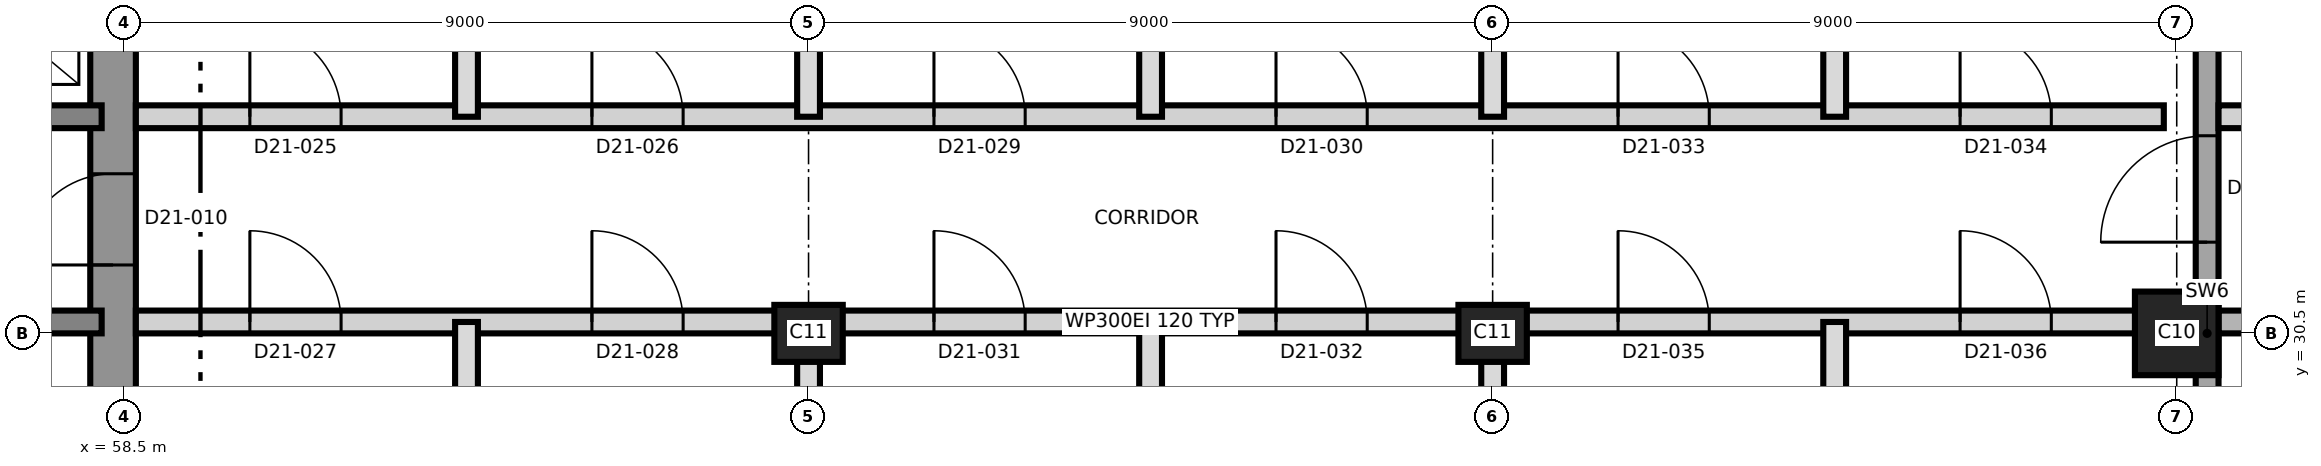
"""IFC4 building model, lengths in metres.
Left out: names, types, materials, properties, quantities, classifications, styles, units other than length and angle.
Written with IfcOpenShell. Run it as: python <this file> out.ifc"""

import sys

from ifc_helpers import new_model, si_unit, direction, frame, frame_2d, origin, origin_2d, place, context, subcontext, project, spatial, rectangle, extrude, element, fill, save


model = new_model("IFC4")
c1 = context("Model", 3, precision=1e-05, world=origin(), true_north=direction((0.0, 1.0)))
c2 = subcontext(c1, "Body", "Model", "MODEL_VIEW")
j1 = project(units=[si_unit("LENGTHUNIT", "METRE"), si_unit("PLANEANGLEUNIT", "RADIAN")], contexts=[c1])
p1 = place(None, origin())
s1 = spatial("IfcSite", under=j1, at=p1, CompositionType="ELEMENT")
p2 = place(p1, origin())
s2 = spatial("IfcBuilding", under=s1, at=p2, CompositionType="ELEMENT")
p3 = place(p2, frame((0.0, 0.0, 190.3)))
s3 = spatial("IfcBuildingStorey", under=s2, at=p3, CompositionType="ELEMENT", Elevation=190.3)
p4 = place(p3, frame((58.35, 21.2, 0.0), z_axis=(0.0, 0.0, 1.0), x_axis=(0.0, 1.0, 0.0)))
e1 = element("IfcWall", 1, at=p4, inside=s3, PredefinedType="SHEAR", context=c2, shape_type="SweptSolid", body=[
    extrude(rectangle(XDim=18.6, YDim=0.6, at=frame_2d((9.3, 0.0))), origin(), (0.0, 0.0, 1.0), 5.5),
])
p5 = place(p4, frame((10.2, 0.0, 0.0)))
e2 = element("IfcOpeningElement", 2, at=p5, cuts=e1, PredefinedType="OPENING", context=c2, shape_type="SweptSolid", body=[
    extrude(rectangle(XDim=1.2, YDim=2.1, at=frame_2d((0.6, 1.05))), frame((0.0, 0.31, 0.0), z_axis=(0.0, -1.0, 0.0), x_axis=(1.0, 0.0, 0.0)), (0.0, 0.0, 1.0), 0.62),
])
p6 = place(p3, frame((31.8, 30.65, 0.0), z_axis=(0.0, 0.0, 1.0), x_axis=(1.0, 0.0, 0.0)))
e3 = element("IfcWall", 3, at=p6, inside=s3, PredefinedType="SHEAR", context=c2, shape_type="SweptSolid", body=[
    extrude(rectangle(XDim=26.4, YDim=0.3, at=frame_2d((13.2, 0.0))), origin(), (0.0, 0.0, 1.0), 5.5),
])
p7 = place(p6, frame((24.7, 0.0, 0.0)))
e4 = element("IfcOpeningElement", 4, at=p7, cuts=e3, PredefinedType="OPENING", context=c2, shape_type="SweptSolid", body=[
    extrude(rectangle(XDim=1.0, YDim=2.1, at=frame_2d((0.5, 1.05))), frame((0.0, 0.16, 0.0), z_axis=(0.0, -1.0, 0.0), x_axis=(1.0, 0.0, 0.0)), (0.0, 0.0, 1.0), 0.32),
])
p8 = place(p3, frame((31.8, 33.35, 0.0), z_axis=(0.0, 0.0, 1.0), x_axis=(1.0, 0.0, 0.0)))
e5 = element("IfcWall", 5, at=p8, inside=s3, PredefinedType="SHEAR", context=c2, shape_type="SweptSolid", body=[
    extrude(rectangle(XDim=26.4, YDim=0.3, at=frame_2d((13.2, 0.0))), origin(), (0.0, 0.0, 1.0), 5.5),
])
p9 = place(p8, frame((13.85, 0.0, 0.0)))
e6 = element("IfcOpeningElement", 6, at=p9, cuts=e5, PredefinedType="OPENING", context=c2, shape_type="SweptSolid", body=[
    extrude(rectangle(XDim=1.4, YDim=2.1, at=frame_2d((0.7, 1.05))), frame((0.0, 0.16, 0.0), z_axis=(0.0, -1.0, 0.0), x_axis=(1.0, 0.0, 0.0)), (0.0, 0.0, 1.0), 0.32),
])
p10 = place(p8, frame((5.325, 0.0, 0.0)))
e7 = element("IfcOpeningElement", 7, at=p10, cuts=e5, PredefinedType="OPENING", context=c2, shape_type="SweptSolid", body=[
    extrude(rectangle(XDim=1.2, YDim=2.1, at=frame_2d((0.6, 1.05))), frame((0.0, 0.16, 0.0), z_axis=(0.0, -1.0, 0.0), x_axis=(1.0, 0.0, 0.0)), (0.0, 0.0, 1.0), 0.32),
])
p11 = place(p8, frame((19.875, 0.0, 0.0)))
e8 = element("IfcOpeningElement", 8, at=p11, cuts=e5, PredefinedType="OPENING", context=c2, shape_type="SweptSolid", body=[
    extrude(rectangle(XDim=1.2, YDim=2.1, at=frame_2d((0.6, 1.05))), frame((0.0, 0.16, 0.0), z_axis=(0.0, -1.0, 0.0), x_axis=(1.0, 0.0, 0.0)), (0.0, 0.0, 1.0), 0.32),
])
for number, where, z_axis, x_axis in (
    (9, (67.5, 30.5, 0.0), (0.0, 0.0, 1.0), (1.0, 0.0, 0.0)),
    (10, (76.5, 30.5, 0.0), (0.0, 0.0, 1.0), (1.0, 0.0, 0.0)),
):
    element("IfcColumn", number, at=place(p3, frame(where, z_axis=z_axis, x_axis=x_axis)), inside=s3, PredefinedType="COLUMN", context=c2, shape_type="SweptSolid", body=[
        extrude(rectangle(XDim=0.9, YDim=0.75, at=origin_2d()), origin(), (0.0, 0.0, 1.0), 5.5),
    ])
p12 = place(p3, frame((85.5, 30.5, 0.0), z_axis=(0.0, 0.0, 1.0), x_axis=(1.0, 0.0, 0.0)))
e11 = element("IfcColumn", 11, at=p12, inside=s3, PredefinedType="COLUMN", context=c2, shape_type="SweptSolid", body=[
    extrude(rectangle(XDim=1.1, YDim=1.1, at=origin_2d()), origin(), (0.0, 0.0, 1.0), 5.5),
])
p13 = place(p3, frame((85.9, 20.35, 0.0), z_axis=(0.0, 0.0, 1.0), x_axis=(0.0, 1.0, 0.0)))
e12 = element("IfcWall", 12, at=p13, inside=s3, PredefinedType="SHEAR", context=c2, shape_type="SweptSolid", body=[
    extrude(rectangle(XDim=20.3, YDim=0.3, at=frame_2d((10.15, 0.0))), origin(), (0.0, 0.0, 1.0), 5.5),
])
p14 = place(p13, frame((11.35, 0.0, 0.0)))
e13 = element("IfcOpeningElement", 13, at=p14, cuts=e12, PredefinedType="OPENING", context=c2, shape_type="SweptSolid", body=[
    extrude(rectangle(XDim=1.4, YDim=2.1, at=frame_2d((0.7, 1.05))), frame((0.0, 0.16, 0.0), z_axis=(0.0, -1.0, 0.0), x_axis=(1.0, 0.0, 0.0)), (0.0, 0.0, 1.0), 0.32),
])
p15 = place(p3, frame((58.65, 30.65, 0.0), z_axis=(0.0, 0.0, 1.0), x_axis=(1.0, 0.0, 0.0)))
e14 = element("IfcWall", 14, at=p15, inside=s3, PredefinedType="PARTITIONING", context=c2, shape_type="SweptSolid", body=[
    extrude(rectangle(XDim=26.68, YDim=0.3, at=frame_2d((13.34, 0.0))), origin(), (0.0, 0.0, 1.0), 5.2),
])
p16 = place(p15, frame((1.5, 0.0, 0.0)))
e15 = element("IfcOpeningElement", 15, at=p16, cuts=e14, PredefinedType="OPENING", context=c2, shape_type="SweptSolid", body=[
    extrude(rectangle(XDim=1.2, YDim=2.1, at=frame_2d((0.6, 1.05))), frame((0.0, 0.16, 0.0), z_axis=(0.0, -1.0, 0.0), x_axis=(1.0, 0.0, 0.0)), (0.0, 0.0, 1.0), 0.32),
])
p17 = place(p15, frame((6.0, 0.0, 0.0)))
e16 = element("IfcOpeningElement", 16, at=p17, cuts=e14, PredefinedType="OPENING", context=c2, shape_type="SweptSolid", body=[
    extrude(rectangle(XDim=1.2, YDim=2.1, at=frame_2d((0.6, 1.05))), frame((0.0, 0.16, 0.0), z_axis=(0.0, -1.0, 0.0), x_axis=(1.0, 0.0, 0.0)), (0.0, 0.0, 1.0), 0.32),
])
p18 = place(p15, frame((10.5, 0.0, 0.0)))
e17 = element("IfcOpeningElement", 17, at=p18, cuts=e14, PredefinedType="OPENING", context=c2, shape_type="SweptSolid", body=[
    extrude(rectangle(XDim=1.2, YDim=2.1, at=frame_2d((0.6, 1.05))), frame((0.0, 0.16, 0.0), z_axis=(0.0, -1.0, 0.0), x_axis=(1.0, 0.0, 0.0)), (0.0, 0.0, 1.0), 0.32),
])
p19 = place(p15, frame((15.0, 0.0, 0.0)))
e18 = element("IfcOpeningElement", 18, at=p19, cuts=e14, PredefinedType="OPENING", context=c2, shape_type="SweptSolid", body=[
    extrude(rectangle(XDim=1.2, YDim=2.1, at=frame_2d((0.6, 1.05))), frame((0.0, 0.16, 0.0), z_axis=(0.0, -1.0, 0.0), x_axis=(1.0, 0.0, 0.0)), (0.0, 0.0, 1.0), 0.32),
])
p20 = place(p15, frame((19.5, 0.0, 0.0)))
e19 = element("IfcOpeningElement", 19, at=p20, cuts=e14, PredefinedType="OPENING", context=c2, shape_type="SweptSolid", body=[
    extrude(rectangle(XDim=1.2, YDim=2.1, at=frame_2d((0.6, 1.05))), frame((0.0, 0.16, 0.0), z_axis=(0.0, -1.0, 0.0), x_axis=(1.0, 0.0, 0.0)), (0.0, 0.0, 1.0), 0.32),
])
p21 = place(p15, frame((24.0, 0.0, 0.0)))
e20 = element("IfcOpeningElement", 20, at=p21, cuts=e14, PredefinedType="OPENING", context=c2, shape_type="SweptSolid", body=[
    extrude(rectangle(XDim=1.2, YDim=2.1, at=frame_2d((0.6, 1.05))), frame((0.0, 0.16, 0.0), z_axis=(0.0, -1.0, 0.0), x_axis=(1.0, 0.0, 0.0)), (0.0, 0.0, 1.0), 0.32),
])
p22 = place(p3, frame((86.05, 30.65, 0.0), z_axis=(0.0, 0.0, 1.0), x_axis=(1.0, 0.0, 0.0)))
e21 = element("IfcWall", 21, at=p22, inside=s3, PredefinedType="SHEAR", context=c2, shape_type="SweptSolid", body=[
    extrude(rectangle(XDim=9.2, YDim=0.3, at=frame_2d((4.6, 0.0))), origin(), (0.0, 0.0, 1.0), 5.2),
])
p23 = place(p22, frame((1.7, 0.0, 0.0)))
e22 = element("IfcOpeningElement", 22, at=p23, cuts=e21, PredefinedType="OPENING", context=c2, shape_type="SweptSolid", body=[
    extrude(rectangle(XDim=1.2, YDim=2.1, at=frame_2d((0.6, 1.05))), frame((0.0, 0.16, 0.0), z_axis=(0.0, -1.0, 0.0), x_axis=(1.0, 0.0, 0.0)), (0.0, 0.0, 1.0), 0.32),
])
p24 = place(p22, frame((5.25, 0.0, 0.0)))
e23 = element("IfcOpeningElement", 23, at=p24, cuts=e21, PredefinedType="OPENING", context=c2, shape_type="SweptSolid", body=[
    extrude(rectangle(XDim=1.0, YDim=2.1, at=frame_2d((0.5, 1.05))), frame((0.0, 0.16, 0.0), z_axis=(0.0, -1.0, 0.0), x_axis=(1.0, 0.0, 0.0)), (0.0, 0.0, 1.0), 0.32),
])
p25 = place(p3, frame((58.65, 33.35, 0.0), z_axis=(0.0, 0.0, 1.0), x_axis=(1.0, 0.0, 0.0)))
e24 = element("IfcWall", 24, at=p25, inside=s3, PredefinedType="PARTITIONING", context=c2, shape_type="SweptSolid", body=[
    extrude(rectangle(XDim=26.68, YDim=0.3, at=frame_2d((13.34, 0.0))), origin(), (0.0, 0.0, 1.0), 5.2),
])
p26 = place(p25, frame((1.5, 0.0, 0.0)))
e25 = element("IfcOpeningElement", 25, at=p26, cuts=e24, PredefinedType="OPENING", context=c2, shape_type="SweptSolid", body=[
    extrude(rectangle(XDim=1.2, YDim=2.1, at=frame_2d((0.6, 1.05))), frame((0.0, 0.16, 0.0), z_axis=(0.0, -1.0, 0.0), x_axis=(1.0, 0.0, 0.0)), (0.0, 0.0, 1.0), 0.32),
])
p27 = place(p25, frame((6.0, 0.0, 0.0)))
e26 = element("IfcOpeningElement", 26, at=p27, cuts=e24, PredefinedType="OPENING", context=c2, shape_type="SweptSolid", body=[
    extrude(rectangle(XDim=1.2, YDim=2.1, at=frame_2d((0.6, 1.05))), frame((0.0, 0.16, 0.0), z_axis=(0.0, -1.0, 0.0), x_axis=(1.0, 0.0, 0.0)), (0.0, 0.0, 1.0), 0.32),
])
p28 = place(p25, frame((10.5, 0.0, 0.0)))
e27 = element("IfcOpeningElement", 27, at=p28, cuts=e24, PredefinedType="OPENING", context=c2, shape_type="SweptSolid", body=[
    extrude(rectangle(XDim=1.2, YDim=2.1, at=frame_2d((0.6, 1.05))), frame((0.0, 0.16, 0.0), z_axis=(0.0, -1.0, 0.0), x_axis=(1.0, 0.0, 0.0)), (0.0, 0.0, 1.0), 0.32),
])
p29 = place(p25, frame((15.0, 0.0, 0.0)))
e28 = element("IfcOpeningElement", 28, at=p29, cuts=e24, PredefinedType="OPENING", context=c2, shape_type="SweptSolid", body=[
    extrude(rectangle(XDim=1.2, YDim=2.1, at=frame_2d((0.6, 1.05))), frame((0.0, 0.16, 0.0), z_axis=(0.0, -1.0, 0.0), x_axis=(1.0, 0.0, 0.0)), (0.0, 0.0, 1.0), 0.32),
])
p30 = place(p25, frame((19.5, 0.0, 0.0)))
e29 = element("IfcOpeningElement", 29, at=p30, cuts=e24, PredefinedType="OPENING", context=c2, shape_type="SweptSolid", body=[
    extrude(rectangle(XDim=1.2, YDim=2.1, at=frame_2d((0.6, 1.05))), frame((0.0, 0.16, 0.0), z_axis=(0.0, -1.0, 0.0), x_axis=(1.0, 0.0, 0.0)), (0.0, 0.0, 1.0), 0.32),
])
p31 = place(p25, frame((24.0, 0.0, 0.0)))
e30 = element("IfcOpeningElement", 30, at=p31, cuts=e24, PredefinedType="OPENING", context=c2, shape_type="SweptSolid", body=[
    extrude(rectangle(XDim=1.2, YDim=2.1, at=frame_2d((0.6, 1.05))), frame((0.0, 0.16, 0.0), z_axis=(0.0, -1.0, 0.0), x_axis=(1.0, 0.0, 0.0)), (0.0, 0.0, 1.0), 0.32),
])
p32 = place(p3, frame((86.05, 33.35, 0.0), z_axis=(0.0, 0.0, 1.0), x_axis=(1.0, 0.0, 0.0)))
e31 = element("IfcWall", 31, at=p32, inside=s3, PredefinedType="PARTITIONING", context=c2, shape_type="SweptSolid", body=[
    extrude(rectangle(XDim=9.325, YDim=0.3, at=frame_2d((4.663, 0.0))), origin(), (0.0, 0.0, 1.0), 5.2),
])
p33 = place(p32, frame((2.35, 0.0, 0.0)))
e32 = element("IfcOpeningElement", 32, at=p33, cuts=e31, PredefinedType="OPENING", context=c2, shape_type="SweptSolid", body=[
    extrude(rectangle(XDim=1.2, YDim=2.1, at=frame_2d((0.6, 1.05))), frame((0.0, 0.16, 0.0), z_axis=(0.0, -1.0, 0.0), x_axis=(1.0, 0.0, 0.0)), (0.0, 0.0, 1.0), 0.32),
])
p34 = place(p3, frame((63.0, 21.9, 0.0), z_axis=(0.0, 0.0, 1.0), x_axis=(0.0, 1.0, 0.0)))
e33 = element("IfcWall", 33, at=p34, inside=s3, PredefinedType="PARTITIONING", context=c2, shape_type="SweptSolid", body=[
    extrude(rectangle(XDim=8.75, YDim=0.3, at=frame_2d((4.375, 0.0))), origin(), (0.0, 0.0, 1.0), 5.2),
])
p35 = place(p3, frame((63.0, 33.35, 0.0), z_axis=(0.0, 0.0, 1.0), x_axis=(0.0, 1.0, 0.0)))
e34 = element("IfcWall", 34, at=p35, inside=s3, PredefinedType="PARTITIONING", context=c2, shape_type="SweptSolid", body=[
    extrude(rectangle(XDim=5.75, YDim=0.3, at=frame_2d((2.875, 0.0))), origin(), (0.0, 0.0, 1.0), 5.2),
])
p36 = place(p3, frame((67.5, 21.9, 0.0), z_axis=(0.0, 0.0, 1.0), x_axis=(0.0, 1.0, 0.0)))
e35 = element("IfcWall", 35, at=p36, inside=s3, PredefinedType="PARTITIONING", context=c2, shape_type="SweptSolid", body=[
    extrude(rectangle(XDim=8.75, YDim=0.3, at=frame_2d((4.375, 0.0))), origin(), (0.0, 0.0, 1.0), 5.2),
])
p37 = place(p3, frame((67.5, 33.35, 0.0), z_axis=(0.0, 0.0, 1.0), x_axis=(0.0, 1.0, 0.0)))
e36 = element("IfcWall", 36, at=p37, inside=s3, PredefinedType="PARTITIONING", context=c2, shape_type="SweptSolid", body=[
    extrude(rectangle(XDim=5.75, YDim=0.3, at=frame_2d((2.875, 0.0))), origin(), (0.0, 0.0, 1.0), 5.2),
])
p38 = place(p3, frame((72.0, 21.9, 0.0), z_axis=(0.0, 0.0, 1.0), x_axis=(0.0, 1.0, 0.0)))
e37 = element("IfcWall", 37, at=p38, inside=s3, PredefinedType="PARTITIONING", context=c2, shape_type="SweptSolid", body=[
    extrude(rectangle(XDim=8.75, YDim=0.3, at=frame_2d((4.375, 0.0))), origin(), (0.0, 0.0, 1.0), 5.2),
])
p39 = place(p3, frame((72.0, 33.35, 0.0), z_axis=(0.0, 0.0, 1.0), x_axis=(0.0, 1.0, 0.0)))
e38 = element("IfcWall", 38, at=p39, inside=s3, PredefinedType="PARTITIONING", context=c2, shape_type="SweptSolid", body=[
    extrude(rectangle(XDim=5.75, YDim=0.3, at=frame_2d((2.875, 0.0))), origin(), (0.0, 0.0, 1.0), 5.2),
])
p40 = place(p3, frame((76.5, 21.9, 0.0), z_axis=(0.0, 0.0, 1.0), x_axis=(0.0, 1.0, 0.0)))
e39 = element("IfcWall", 39, at=p40, inside=s3, PredefinedType="PARTITIONING", context=c2, shape_type="SweptSolid", body=[
    extrude(rectangle(XDim=8.75, YDim=0.3, at=frame_2d((4.375, 0.0))), origin(), (0.0, 0.0, 1.0), 5.2),
])
p41 = place(p3, frame((76.5, 33.35, 0.0), z_axis=(0.0, 0.0, 1.0), x_axis=(0.0, 1.0, 0.0)))
e40 = element("IfcWall", 40, at=p41, inside=s3, PredefinedType="PARTITIONING", context=c2, shape_type="SweptSolid", body=[
    extrude(rectangle(XDim=5.75, YDim=0.3, at=frame_2d((2.875, 0.0))), origin(), (0.0, 0.0, 1.0), 5.2),
])
p42 = place(p3, frame((81.0, 21.9, 0.0), z_axis=(0.0, 0.0, 1.0), x_axis=(0.0, 1.0, 0.0)))
e41 = element("IfcWall", 41, at=p42, inside=s3, PredefinedType="PARTITIONING", context=c2, shape_type="SweptSolid", body=[
    extrude(rectangle(XDim=8.75, YDim=0.3, at=frame_2d((4.375, 0.0))), origin(), (0.0, 0.0, 1.0), 5.2),
])
p43 = place(p3, frame((81.0, 33.35, 0.0), z_axis=(0.0, 0.0, 1.0), x_axis=(0.0, 1.0, 0.0)))
e42 = element("IfcWall", 42, at=p43, inside=s3, PredefinedType="PARTITIONING", context=c2, shape_type="SweptSolid", body=[
    extrude(rectangle(XDim=5.75, YDim=0.3, at=frame_2d((2.875, 0.0))), origin(), (0.0, 0.0, 1.0), 5.2),
])
p44 = place(p5, origin())
e43 = element("IfcDoor", 43, at=p44, inside=s3, OperationType="SINGLE_SWING_LEFT", PredefinedType="DOOR", context=c2, shape_type="SweptSolid", body=[
    extrude(rectangle(XDim=1.2, YDim=2.1, at=frame_2d((0.6, 1.05))), frame((0.0, 0.025, 0.0), z_axis=(0.0, -1.0, 0.0), x_axis=(1.0, 0.0, 0.0)), (0.0, 0.0, 1.0), 0.05),
])
fill(e2, e43)
p45 = place(p26, origin())
e44 = element("IfcDoor", 44, at=p45, inside=s3, OperationType="SINGLE_SWING_LEFT", PredefinedType="DOOR", context=c2, shape_type="SweptSolid", body=[
    extrude(rectangle(XDim=1.2, YDim=2.1, at=frame_2d((0.6, 1.05))), frame((0.0, 0.025, 0.0), z_axis=(0.0, -1.0, 0.0), x_axis=(1.0, 0.0, 0.0)), (0.0, 0.0, 1.0), 0.05),
])
fill(e25, e44)
p46 = place(p27, origin())
e45 = element("IfcDoor", 45, at=p46, inside=s3, OperationType="SINGLE_SWING_LEFT", PredefinedType="DOOR", context=c2, shape_type="SweptSolid", body=[
    extrude(rectangle(XDim=1.2, YDim=2.1, at=frame_2d((0.6, 1.05))), frame((0.0, 0.025, 0.0), z_axis=(0.0, -1.0, 0.0), x_axis=(1.0, 0.0, 0.0)), (0.0, 0.0, 1.0), 0.05),
])
fill(e26, e45)
p47 = place(p16, origin())
e46 = element("IfcDoor", 46, at=p47, inside=s3, OperationType="SINGLE_SWING_RIGHT", PredefinedType="DOOR", context=c2, shape_type="SweptSolid", body=[
    extrude(rectangle(XDim=1.2, YDim=2.1, at=frame_2d((0.6, 1.05))), frame((0.0, 0.025, 0.0), z_axis=(0.0, -1.0, 0.0), x_axis=(1.0, 0.0, 0.0)), (0.0, 0.0, 1.0), 0.05),
])
fill(e15, e46)
p48 = place(p17, origin())
e47 = element("IfcDoor", 47, at=p48, inside=s3, OperationType="SINGLE_SWING_LEFT", PredefinedType="DOOR", context=c2, shape_type="SweptSolid", body=[
    extrude(rectangle(XDim=1.2, YDim=2.1, at=frame_2d((0.6, 1.05))), frame((0.0, 0.025, 0.0), z_axis=(0.0, -1.0, 0.0), x_axis=(1.0, 0.0, 0.0)), (0.0, 0.0, 1.0), 0.05),
])
fill(e16, e47)
p49 = place(p28, origin())
e48 = element("IfcDoor", 48, at=p49, inside=s3, OperationType="SINGLE_SWING_LEFT", PredefinedType="DOOR", context=c2, shape_type="SweptSolid", body=[
    extrude(rectangle(XDim=1.2, YDim=2.1, at=frame_2d((0.6, 1.05))), frame((0.0, 0.025, 0.0), z_axis=(0.0, -1.0, 0.0), x_axis=(1.0, 0.0, 0.0)), (0.0, 0.0, 1.0), 0.05),
])
fill(e27, e48)
p50 = place(p29, origin())
e49 = element("IfcDoor", 49, at=p50, inside=s3, OperationType="SINGLE_SWING_RIGHT", PredefinedType="DOOR", context=c2, shape_type="SweptSolid", body=[
    extrude(rectangle(XDim=1.2, YDim=2.1, at=frame_2d((0.6, 1.05))), frame((0.0, 0.025, 0.0), z_axis=(0.0, -1.0, 0.0), x_axis=(1.0, 0.0, 0.0)), (0.0, 0.0, 1.0), 0.05),
])
fill(e28, e49)
p51 = place(p18, origin())
e50 = element("IfcDoor", 50, at=p51, inside=s3, OperationType="SINGLE_SWING_LEFT", PredefinedType="DOOR", context=c2, shape_type="SweptSolid", body=[
    extrude(rectangle(XDim=1.2, YDim=2.1, at=frame_2d((0.6, 1.05))), frame((0.0, 0.025, 0.0), z_axis=(0.0, -1.0, 0.0), x_axis=(1.0, 0.0, 0.0)), (0.0, 0.0, 1.0), 0.05),
])
fill(e17, e50)
p52 = place(p19, origin())
e51 = element("IfcDoor", 51, at=p52, inside=s3, OperationType="SINGLE_SWING_LEFT", PredefinedType="DOOR", context=c2, shape_type="SweptSolid", body=[
    extrude(rectangle(XDim=1.2, YDim=2.1, at=frame_2d((0.6, 1.05))), frame((0.0, 0.025, 0.0), z_axis=(0.0, -1.0, 0.0), x_axis=(1.0, 0.0, 0.0)), (0.0, 0.0, 1.0), 0.05),
])
fill(e18, e51)
p53 = place(p30, origin())
e52 = element("IfcDoor", 52, at=p53, inside=s3, OperationType="SINGLE_SWING_RIGHT", PredefinedType="DOOR", context=c2, shape_type="SweptSolid", body=[
    extrude(rectangle(XDim=1.2, YDim=2.1, at=frame_2d((0.6, 1.05))), frame((0.0, 0.025, 0.0), z_axis=(0.0, -1.0, 0.0), x_axis=(1.0, 0.0, 0.0)), (0.0, 0.0, 1.0), 0.05),
])
fill(e29, e52)
p54 = place(p31, origin())
e53 = element("IfcDoor", 53, at=p54, inside=s3, OperationType="SINGLE_SWING_LEFT", PredefinedType="DOOR", context=c2, shape_type="SweptSolid", body=[
    extrude(rectangle(XDim=1.2, YDim=2.1, at=frame_2d((0.6, 1.05))), frame((0.0, 0.025, 0.0), z_axis=(0.0, -1.0, 0.0), x_axis=(1.0, 0.0, 0.0)), (0.0, 0.0, 1.0), 0.05),
])
fill(e30, e53)
p55 = place(p20, origin())
e54 = element("IfcDoor", 54, at=p55, inside=s3, OperationType="SINGLE_SWING_LEFT", PredefinedType="DOOR", context=c2, shape_type="SweptSolid", body=[
    extrude(rectangle(XDim=1.2, YDim=2.1, at=frame_2d((0.6, 1.05))), frame((0.0, 0.025, 0.0), z_axis=(0.0, -1.0, 0.0), x_axis=(1.0, 0.0, 0.0)), (0.0, 0.0, 1.0), 0.05),
])
fill(e19, e54)
p56 = place(p21, origin())
e55 = element("IfcDoor", 55, at=p56, inside=s3, OperationType="SINGLE_SWING_RIGHT", PredefinedType="DOOR", context=c2, shape_type="SweptSolid", body=[
    extrude(rectangle(XDim=1.2, YDim=2.1, at=frame_2d((0.6, 1.05))), frame((0.0, 0.025, 0.0), z_axis=(0.0, -1.0, 0.0), x_axis=(1.0, 0.0, 0.0)), (0.0, 0.0, 1.0), 0.05),
])
fill(e20, e55)
p57 = place(p14, origin())
e56 = element("IfcDoor", 56, at=p57, inside=s3, OperationType="SINGLE_SWING_RIGHT", PredefinedType="DOOR", context=c2, shape_type="SweptSolid", body=[
    extrude(rectangle(XDim=1.4, YDim=2.1, at=frame_2d((0.7, 1.05))), frame((0.0, 0.025, 0.0), z_axis=(0.0, -1.0, 0.0), x_axis=(1.0, 0.0, 0.0)), (0.0, 0.0, 1.0), 0.05),
])
fill(e13, e56)
save(model, sys.argv[1])
